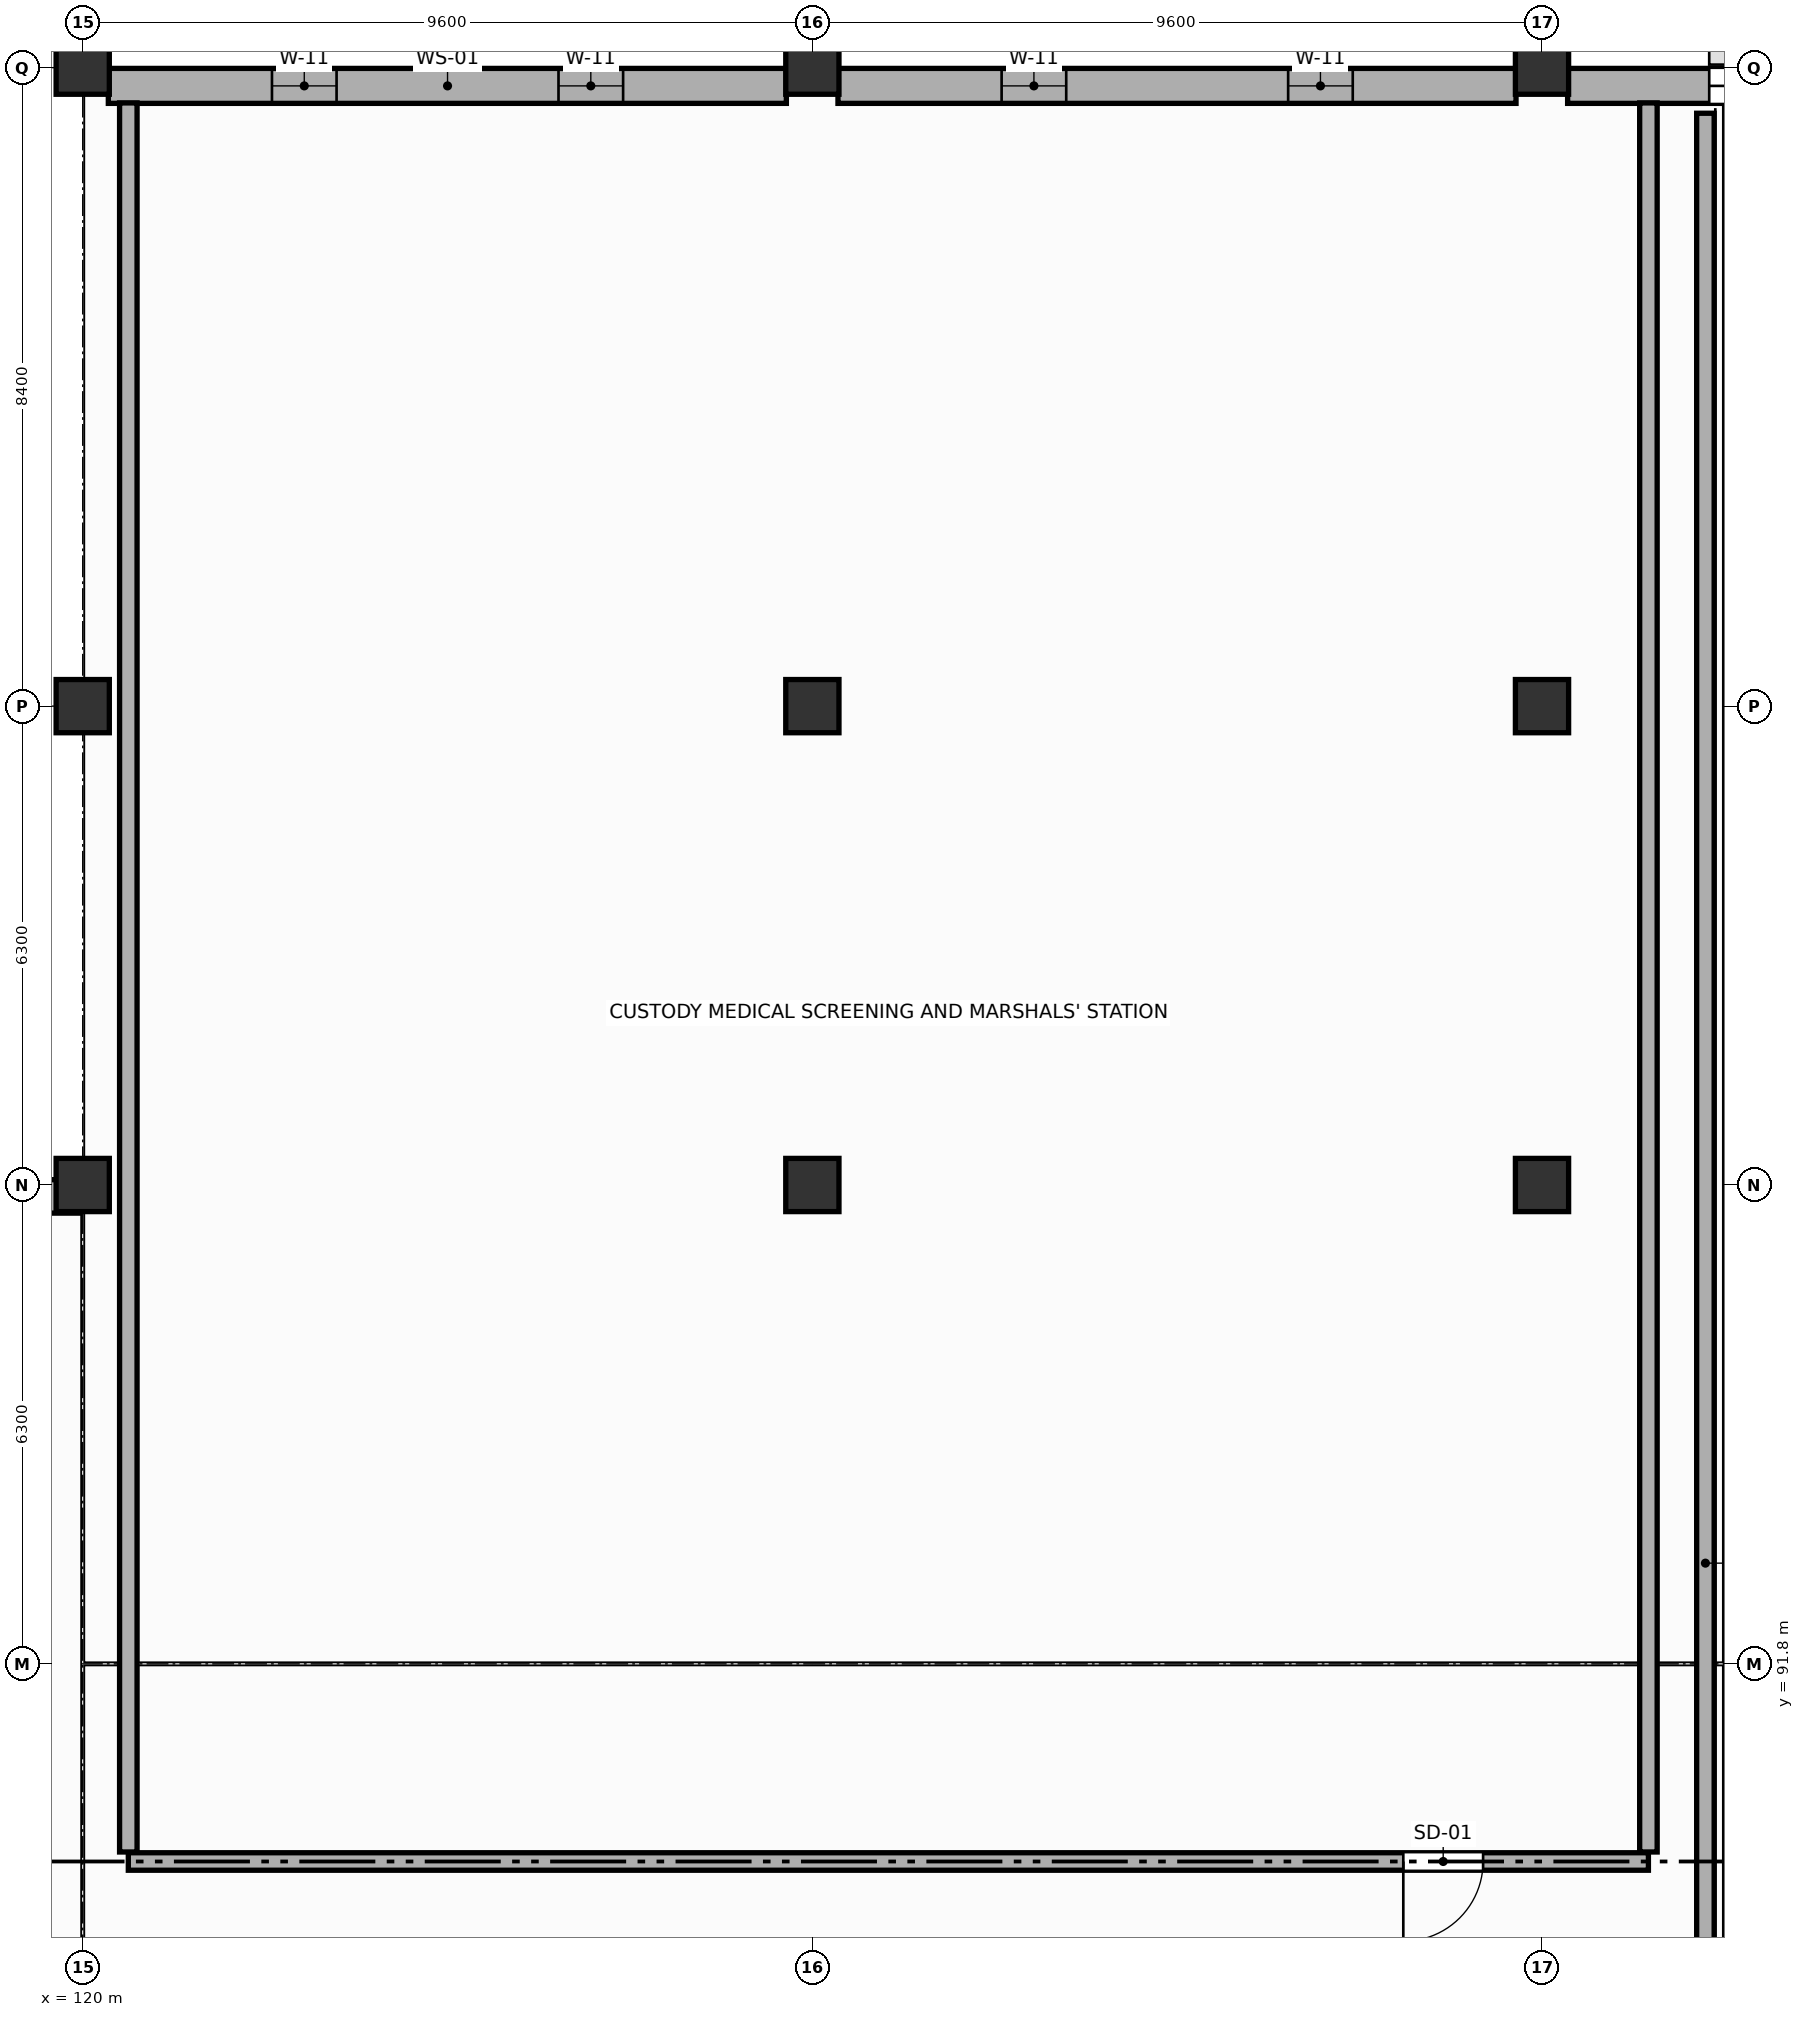
"""IFC4 building model, lengths in metres.
Left out: names, types, materials, properties, quantities, classifications, styles, units other than length and angle.
Written with IfcOpenShell. Run it as: python <this file> out.ifc"""

import sys

from ifc_helpers import new_model, si_unit, direction, frame, frame_2d, origin, origin_2d, place, context, subcontext, project, spatial, rectangle, extrude, element, fill, save


model = new_model("IFC4")
c1 = context("Model", 3, precision=1e-05, world=origin(), true_north=direction((0.0, 1.0)))
c2 = subcontext(c1, "Body", "Model", "MODEL_VIEW")
j1 = project(units=[si_unit("LENGTHUNIT", "METRE"), si_unit("PLANEANGLEUNIT", "RADIAN")], contexts=[c1])
p1 = place(None, origin())
s1 = spatial("IfcSite", under=j1, at=p1, CompositionType="ELEMENT")
p2 = place(p1, origin())
s2 = spatial("IfcBuilding", under=s1, at=p2, CompositionType="ELEMENT")
p3 = place(p2, origin())
s3 = spatial("IfcBuildingStorey", under=s2, at=p3, CompositionType="ELEMENT", Elevation=0.0)
for number, where, z_axis, x_axis in (
    (1, (120.0, 98.1, 0.0), (0.0, 0.0, 1.0), (1.0, 0.0, 0.0)),
    (2, (120.0, 104.4, 0.0), (0.0, 0.0, 1.0), (1.0, 0.0, 0.0)),
    (3, (120.0, 112.8, 0.0), (0.0, 0.0, 1.0), (1.0, 0.0, 0.0)),
    (4, (129.6, 98.1, 0.0), (0.0, 0.0, 1.0), (1.0, 0.0, 0.0)),
    (5, (129.6, 104.4, 0.0), (0.0, 0.0, 1.0), (1.0, 0.0, 0.0)),
    (6, (129.6, 112.8, 0.0), (0.0, 0.0, 1.0), (1.0, 0.0, 0.0)),
    (7, (139.2, 98.1, 0.0), (0.0, 0.0, 1.0), (1.0, 0.0, 0.0)),
    (8, (139.2, 104.4, 0.0), (0.0, 0.0, 1.0), (1.0, 0.0, 0.0)),
    (9, (139.2, 112.8, 0.0), (0.0, 0.0, 1.0), (1.0, 0.0, 0.0)),
):
    element("IfcColumn", number, at=place(p3, frame(where, z_axis=z_axis, x_axis=x_axis)), inside=s3, PredefinedType="COLUMN", context=c2, shape_type="SweptSolid", body=[
        extrude(rectangle(XDim=0.7, YDim=0.7, at=origin_2d()), origin(), (0.0, 0.0, 1.0), 5.4),
    ])
p4 = place(p3, frame((120.337, 112.56, 0.0), z_axis=(0.0, 0.0, 1.0), x_axis=(1.0, 0.0, 0.0)))
e10 = element("IfcWall", 10, at=p4, inside=s3, PredefinedType="STANDARD", context=c2, shape_type="SweptSolid", body=[
    extrude(rectangle(XDim=8.921, YDim=0.46, at=frame_2d((4.46, 0.0))), origin(), (0.0, 0.0, 1.0), 4.62),
])
p5 = place(p4, frame((2.153, 0.0, 2.15)))
e11 = element("IfcOpeningElement", 11, at=p5, cuts=e10, PredefinedType="OPENING", context=c2, shape_type="SweptSolid", body=[
    extrude(rectangle(XDim=0.85, YDim=0.9, at=frame_2d((0.425, 0.45))), frame((0.0, 0.24, 0.0), z_axis=(0.0, -1.0, 0.0), x_axis=(1.0, 0.0, 0.0)), (0.0, 0.0, 1.0), 0.48),
])
p6 = place(p4, frame((5.923, 0.0, 2.15)))
e12 = element("IfcOpeningElement", 12, at=p6, cuts=e10, PredefinedType="OPENING", context=c2, shape_type="SweptSolid", body=[
    extrude(rectangle(XDim=0.85, YDim=0.9, at=frame_2d((0.425, 0.45))), frame((0.0, 0.24, 0.0), z_axis=(0.0, -1.0, 0.0), x_axis=(1.0, 0.0, 0.0)), (0.0, 0.0, 1.0), 0.48),
])
p7 = place(p3, frame((129.937, 112.56, 0.0), z_axis=(0.0, 0.0, 1.0), x_axis=(1.0, 0.0, 0.0)))
e13 = element("IfcWall", 13, at=p7, inside=s3, PredefinedType="STANDARD", context=c2, shape_type="SweptSolid", body=[
    extrude(rectangle(XDim=8.921, YDim=0.46, at=frame_2d((4.46, 0.0))), origin(), (0.0, 0.0, 1.0), 4.62),
])
p8 = place(p7, frame((2.153, 0.0, 2.15)))
e14 = element("IfcOpeningElement", 14, at=p8, cuts=e13, PredefinedType="OPENING", context=c2, shape_type="SweptSolid", body=[
    extrude(rectangle(XDim=0.85, YDim=0.9, at=frame_2d((0.425, 0.45))), frame((0.0, 0.24, 0.0), z_axis=(0.0, -1.0, 0.0), x_axis=(1.0, 0.0, 0.0)), (0.0, 0.0, 1.0), 0.48),
])
p9 = place(p7, frame((5.923, 0.0, 2.15)))
e15 = element("IfcOpeningElement", 15, at=p9, cuts=e13, PredefinedType="OPENING", context=c2, shape_type="SweptSolid", body=[
    extrude(rectangle(XDim=0.85, YDim=0.9, at=frame_2d((0.425, 0.45))), frame((0.0, 0.24, 0.0), z_axis=(0.0, -1.0, 0.0), x_axis=(1.0, 0.0, 0.0)), (0.0, 0.0, 1.0), 0.48),
])
p10 = place(p3, frame((139.537, 112.56, 0.0), z_axis=(0.0, 0.0, 1.0), x_axis=(1.0, 0.0, 0.0)))
e16 = element("IfcWall", 16, at=p10, inside=s3, PredefinedType="STANDARD", context=c2, shape_type="SweptSolid", body=[
    extrude(rectangle(XDim=8.926, YDim=0.46, at=frame_2d((4.463, 0.0))), origin(), (0.0, 0.0, 1.0), 4.62),
])
p11 = place(p10, frame((1.863, 0.0, 0.0)))
e17 = element("IfcOpeningElement", 17, at=p11, cuts=e16, PredefinedType="OPENING", context=c2, shape_type="SweptSolid", body=[
    extrude(rectangle(XDim=6.6, YDim=3.2, at=frame_2d((3.3, 1.6))), frame((0.0, 0.24, 0.0), z_axis=(0.0, -1.0, 0.0), x_axis=(1.0, 0.0, 0.0)), (0.0, 0.0, 1.0), 0.48),
])
p12 = place(p3, frame((112.85, 97.95, 0.0), z_axis=(0.0, 0.0, 1.0), x_axis=(1.0, 0.0, 0.0)))
e18 = element("IfcWall", 18, at=p12, inside=s3, PredefinedType="STANDARD", context=c2, shape_type="SweptSolid", body=[
    extrude(rectangle(XDim=7.1, YDim=0.44, at=frame_2d((3.55, 0.0))), origin(), (0.0, 0.0, 1.0), 4.27),
])
p13 = place(p3, frame((141.35, 74.05, 0.0), z_axis=(0.0, 0.0, 1.0), x_axis=(0.0, 1.0, 0.0)))
e19 = element("IfcWall", 19, at=p13, inside=s3, PredefinedType="STANDARD", context=c2, shape_type="SweptSolid", body=[
    extrude(rectangle(XDim=38.15, YDim=0.23, at=frame_2d((19.075, 0.0))), origin(), (0.0, 0.0, 1.0), 4.37),
])
p14 = place(p3, frame((140.6, 89.2, 0.0), z_axis=(0.0, 0.0, 1.0), x_axis=(-1.0, 0.0, 0.0)))
e20 = element("IfcWall", 20, at=p14, inside=s3, PredefinedType="STANDARD", context=c2, shape_type="SweptSolid", body=[
    extrude(rectangle(XDim=20.0, YDim=0.23, at=frame_2d((10.0, 0.0))), origin(), (0.0, 0.0, 1.0), 4.27),
])
p15 = place(p14, frame((2.175, 0.0, 0.0)))
e21 = element("IfcOpeningElement", 21, at=p15, cuts=e20, PredefinedType="OPENING", context=c2, shape_type="SweptSolid", body=[
    extrude(rectangle(XDim=1.05, YDim=2.15, at=frame_2d((0.525, 1.075))), frame((0.0, 0.125, 0.0), z_axis=(0.0, -1.0, 0.0), x_axis=(1.0, 0.0, 0.0)), (0.0, 0.0, 1.0), 0.25),
])
for number, where, z_axis, x_axis in (
    (22, (120.6, 89.325, 0.0), (0.0, 0.0, 1.0), (0.0, 1.0, 0.0)),
    (23, (140.6, 112.336, 0.0), (0.0, 0.0, 1.0), (0.0, -1.0, 0.0)),
):
    element("IfcWall", number, at=place(p3, frame(where, z_axis=z_axis, x_axis=x_axis)), inside=s3, PredefinedType="STANDARD", context=c2, shape_type="SweptSolid", body=[
        extrude(rectangle(XDim=23.011, YDim=0.23, at=frame_2d((11.505, 0.0))), origin(), (0.0, 0.0, 1.0), 4.37),
    ])
p16 = place(p5, origin())
e24 = element("IfcWindow", 24, at=p16, inside=s3, PartitioningType="SINGLE_PANEL", PredefinedType="WINDOW", context=c2, shape_type="SweptSolid", body=[
    extrude(rectangle(XDim=0.85, YDim=0.9, at=frame_2d((0.425, 0.45))), frame((0.0, 0.03, 0.0), z_axis=(0.0, -1.0, 0.0), x_axis=(1.0, 0.0, 0.0)), (0.0, 0.0, 1.0), 0.06),
])
fill(e11, e24)
p17 = place(p6, origin())
e25 = element("IfcWindow", 25, at=p17, inside=s3, PartitioningType="SINGLE_PANEL", PredefinedType="WINDOW", context=c2, shape_type="SweptSolid", body=[
    extrude(rectangle(XDim=0.85, YDim=0.9, at=frame_2d((0.425, 0.45))), frame((0.0, 0.03, 0.0), z_axis=(0.0, -1.0, 0.0), x_axis=(1.0, 0.0, 0.0)), (0.0, 0.0, 1.0), 0.06),
])
fill(e12, e25)
p18 = place(p8, origin())
e26 = element("IfcWindow", 26, at=p18, inside=s3, PartitioningType="SINGLE_PANEL", PredefinedType="WINDOW", context=c2, shape_type="SweptSolid", body=[
    extrude(rectangle(XDim=0.85, YDim=0.9, at=frame_2d((0.425, 0.45))), frame((0.0, 0.03, 0.0), z_axis=(0.0, -1.0, 0.0), x_axis=(1.0, 0.0, 0.0)), (0.0, 0.0, 1.0), 0.06),
])
fill(e14, e26)
p19 = place(p9, origin())
e27 = element("IfcWindow", 27, at=p19, inside=s3, PartitioningType="SINGLE_PANEL", PredefinedType="WINDOW", context=c2, shape_type="SweptSolid", body=[
    extrude(rectangle(XDim=0.85, YDim=0.9, at=frame_2d((0.425, 0.45))), frame((0.0, 0.03, 0.0), z_axis=(0.0, -1.0, 0.0), x_axis=(1.0, 0.0, 0.0)), (0.0, 0.0, 1.0), 0.06),
])
fill(e15, e27)
p20 = place(p11, origin())
e28 = element("IfcDoor", 28, at=p20, inside=s3, OperationType="ROLLINGUP", PredefinedType="GATE", context=c2, shape_type="SweptSolid", body=[
    extrude(rectangle(XDim=6.6, YDim=3.2, at=frame_2d((3.3, 1.6))), frame((0.0, 0.025, 0.0), z_axis=(0.0, -1.0, 0.0), x_axis=(1.0, 0.0, 0.0)), (0.0, 0.0, 1.0), 0.05),
])
fill(e17, e28)
p21 = place(p15, origin())
e29 = element("IfcDoor", 29, at=p21, inside=s3, OperationType="SINGLE_SWING_RIGHT", PredefinedType="DOOR", context=c2, shape_type="SweptSolid", body=[
    extrude(rectangle(XDim=1.05, YDim=2.15, at=frame_2d((0.525, 1.075))), frame((0.0, 0.025, 0.0), z_axis=(0.0, -1.0, 0.0), x_axis=(1.0, 0.0, 0.0)), (0.0, 0.0, 1.0), 0.05),
])
fill(e21, e29)
save(model, sys.argv[1])
